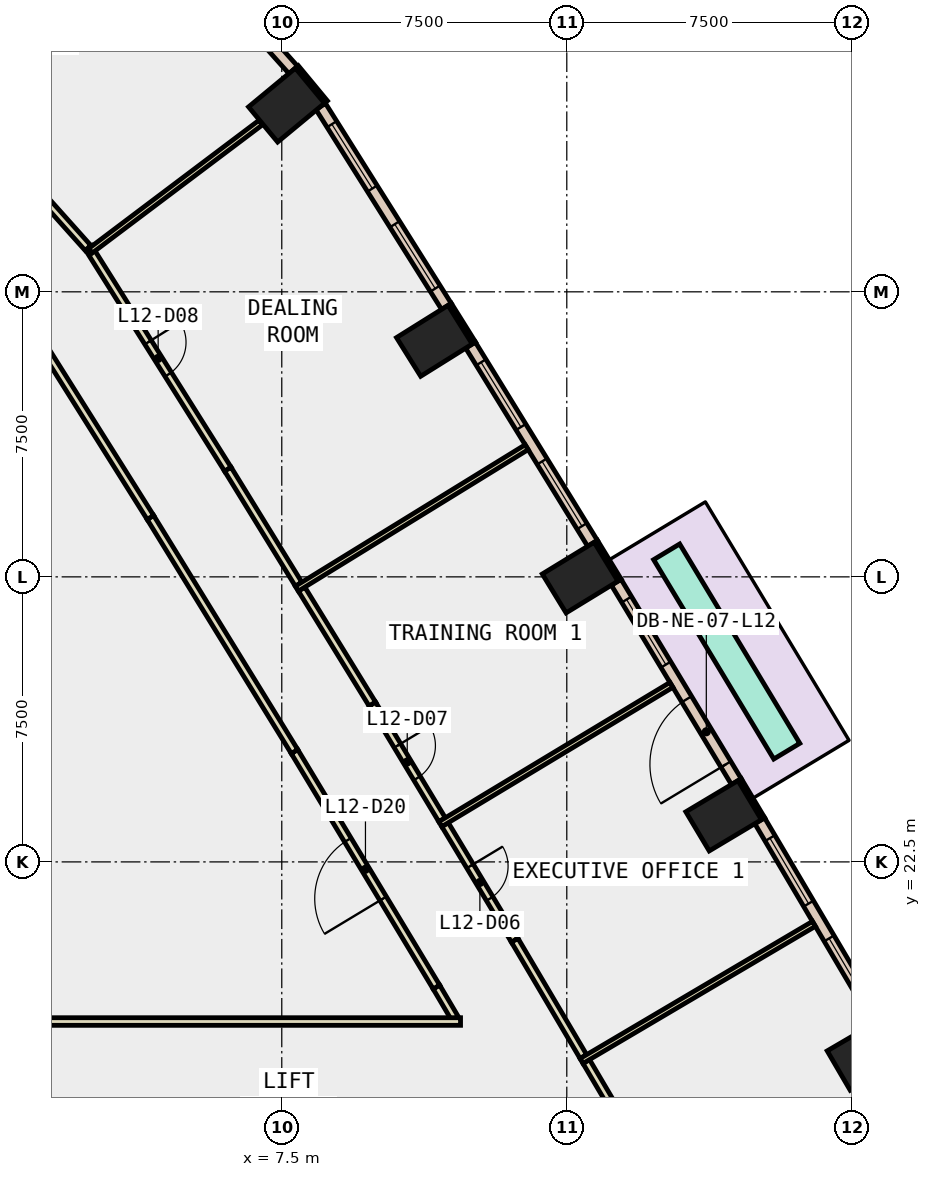
"""IFC4 building model, lengths in metres.
Left out: names, types, materials, properties, quantities, classifications, styles, units other than length and angle.
Written with IfcOpenShell. Run it as: python <this file> out.ifc"""

import sys

from ifc_helpers import new_model, si_unit, direction, frame, frame_2d, origin, origin_2d, place, context, subcontext, project, spatial, rectangle, extrude, element, fill, save


model = new_model("IFC4")
c1 = context("Model", 3, precision=1e-05, world=origin(), true_north=direction((0.0, 1.0)))
c2 = subcontext(c1, "Body", "Model", "MODEL_VIEW")
j1 = project(units=[si_unit("LENGTHUNIT", "METRE"), si_unit("PLANEANGLEUNIT", "RADIAN")], contexts=[c1])
p1 = place(None, origin())
s1 = spatial("IfcSite", under=j1, at=p1, CompositionType="ELEMENT")
p2 = place(p1, origin())
s2 = spatial("IfcBuilding", under=s1, at=p2, CompositionType="ELEMENT")
p3 = place(p2, frame((0.0, 0.0, 60.2)))
s3 = spatial("IfcBuildingStorey", under=s2, at=p3, CompositionType="ELEMENT", Elevation=60.2)
for number, where, z_axis, x_axis in (
    (1, (22.846, 17.413, -0.4), (0.0, 0.0, 1.0), (-0.504, 0.864, 0.0)),
    (2, (19.127, 23.714, -0.4), (0.0, 0.0, 1.0), (-0.513, 0.858, 0.0)),
    (3, (15.351, 29.981, -0.4), (0.0, 0.0, 1.0), (-0.522, 0.853, 0.0)),
    (4, (11.516, 36.211, -0.4), (0.0, 0.0, 1.0), (-0.53, 0.848, 0.0)),
    (5, (7.625, 42.414, -0.4), (0.0, 0.0, 1.0), (-0.638, 0.77, 0.0)),
):
    element("IfcColumn", number, at=place(p3, frame(where, z_axis=z_axis, x_axis=x_axis)), inside=s3, PredefinedType="COLUMN", context=c2, shape_type="SweptSolid", body=[
        extrude(rectangle(XDim=1.2, YDim=1.6, at=origin_2d()), origin(), (0.0, 0.0, 1.0), 4.2),
    ])
for number, where, z_axis, x_axis in (
    (6, (20.165, 23.635, 0.0), (0.0, 0.0, 1.0), (-0.513, 0.858, 0.0)),
    (7, (16.389, 29.912, 0.0), (0.0, 0.0, 1.0), (-0.522, 0.853, 0.0)),
):
    element("IfcWall", number, at=place(p3, frame(where, z_axis=z_axis, x_axis=x_axis)), inside=s3, PredefinedType="STANDARD", context=c2, shape_type="SweptSolid", body=[
        extrude(rectangle(XDim=1.2, YDim=0.1, at=frame_2d((0.6, 0.0))), origin(), (0.0, 0.0, 1.0), 3.8),
    ])
p4 = place(p3, frame((12.555, 36.153, 0.0), z_axis=(0.0, 0.0, 1.0), x_axis=(-0.530273374944, 0.847826720401, 0.0)))
e8 = element("IfcWall", 8, at=p4, inside=s3, PredefinedType="STANDARD", context=c2, shape_type="SweptSolid", body=[
    extrude(rectangle(XDim=1.199, YDim=0.1, at=frame_2d((0.6, 0.0))), origin(), (0.0, 0.0, 1.0), 3.8),
])
p5 = place(p3, frame((8.662, 42.494, 0.0), z_axis=(0.0, 0.0, 1.0), x_axis=(-0.637759271497, 0.770235750676, 0.0)))
e9 = element("IfcWall", 9, at=p5, inside=s3, PredefinedType="STANDARD", context=c2, shape_type="SweptSolid", body=[
    extrude(rectangle(XDim=1.2, YDim=0.1, at=frame_2d((0.6, 0.0))), origin(), (0.0, 0.0, 1.0), 3.8),
])
p6 = place(p3, frame((23.189, 18.307, 0.0), z_axis=(0.0, 0.0, 1.0), x_axis=(-0.508163938648, 0.861260362177, 0.0)))
e10 = element("IfcWall", 10, at=p6, inside=s3, PredefinedType="STANDARD", context=c2, shape_type="SweptSolid", body=[
    extrude(rectangle(XDim=6.126, YDim=0.3, at=frame_2d((3.063, 0.0))), origin(), (0.0, 0.0, 1.0), 3.8),
])
p7 = place(p6, frame((0.531, 0.0, 0.9)))
e11 = element("IfcOpeningElement", 11, at=p7, cuts=e10, PredefinedType="OPENING", context=c2, shape_type="SweptSolid", body=[
    extrude(rectangle(XDim=2.0, YDim=2.6, at=frame_2d((1.0, 1.3))), frame((0.0, 0.16, 0.0), z_axis=(0.0, -1.0, 0.0), x_axis=(1.0, 0.0, 0.0)), (0.0, 0.0, 1.0), 0.32),
])
p8 = place(p6, frame((3.594, 0.0, 0.9)))
e12 = element("IfcOpeningElement", 12, at=p8, cuts=e10, PredefinedType="OPENING", context=c2, shape_type="SweptSolid", body=[
    extrude(rectangle(XDim=2.0, YDim=2.6, at=frame_2d((1.0, 1.3))), frame((0.0, 0.16, 0.0), z_axis=(0.0, -1.0, 0.0), x_axis=(1.0, 0.0, 0.0)), (0.0, 0.0, 1.0), 0.32),
])
p9 = place(p3, frame((19.462, 24.612, 0.0), z_axis=(0.0, 0.0, 1.0), x_axis=(-0.516147563478, 0.856499674674, 0.0)))
e13 = element("IfcWall", 13, at=p9, inside=s3, PredefinedType="STANDARD", context=c2, shape_type="SweptSolid", body=[
    extrude(rectangle(XDim=6.126, YDim=0.3, at=frame_2d((3.063, 0.0))), origin(), (0.0, 0.0, 1.0), 3.8),
])
p10 = place(p9, frame((0.532, 0.0, 0.0)))
e14 = element("IfcOpeningElement", 14, at=p10, cuts=e13, PredefinedType="OPENING", context=c2, shape_type="SweptSolid", body=[
    extrude(rectangle(XDim=2.0, YDim=2.4, at=frame_2d((1.0, 1.2))), frame((0.0, 0.16, 0.0), z_axis=(0.0, -1.0, 0.0), x_axis=(1.0, 0.0, 0.0)), (0.0, 0.0, 1.0), 0.32),
])
p11 = place(p9, frame((3.595, 0.0, 0.9)))
e15 = element("IfcOpeningElement", 15, at=p11, cuts=e13, PredefinedType="OPENING", context=c2, shape_type="SweptSolid", body=[
    extrude(rectangle(XDim=2.0, YDim=2.6, at=frame_2d((1.0, 1.3))), frame((0.0, 0.16, 0.0), z_axis=(0.0, -1.0, 0.0), x_axis=(1.0, 0.0, 0.0)), (0.0, 0.0, 1.0), 0.32),
])
p12 = place(p3, frame((15.677, 30.882, 0.0), z_axis=(0.0, 0.0, 1.0), x_axis=(-0.524239751329, 0.851570715282, 0.0)))
e16 = element("IfcWall", 16, at=p12, inside=s3, PredefinedType="STANDARD", context=c2, shape_type="SweptSolid", body=[
    extrude(rectangle(XDim=6.125, YDim=0.3, at=frame_2d((3.062, 0.0))), origin(), (0.0, 0.0, 1.0), 3.8),
])
p13 = place(p12, frame((0.531, 0.0, 0.9)))
e17 = element("IfcOpeningElement", 17, at=p13, cuts=e16, PredefinedType="OPENING", context=c2, shape_type="SweptSolid", body=[
    extrude(rectangle(XDim=2.0, YDim=2.6, at=frame_2d((1.0, 1.3))), frame((0.0, 0.16, 0.0), z_axis=(0.0, -1.0, 0.0), x_axis=(1.0, 0.0, 0.0)), (0.0, 0.0, 1.0), 0.32),
])
p14 = place(p12, frame((3.594, 0.0, 0.9)))
e18 = element("IfcOpeningElement", 18, at=p14, cuts=e16, PredefinedType="OPENING", context=c2, shape_type="SweptSolid", body=[
    extrude(rectangle(XDim=2.0, YDim=2.6, at=frame_2d((1.0, 1.3))), frame((0.0, 0.16, 0.0), z_axis=(0.0, -1.0, 0.0), x_axis=(1.0, 0.0, 0.0)), (0.0, 0.0, 1.0), 0.32),
])
p15 = place(p3, frame((11.833, 37.116, 0.0), z_axis=(0.0, 0.0, 1.0), x_axis=(-0.532322705893, 0.846541515102, 0.0)))
e19 = element("IfcWall", 19, at=p15, inside=s3, PredefinedType="STANDARD", context=c2, shape_type="SweptSolid", body=[
    extrude(rectangle(XDim=6.218, YDim=0.3, at=frame_2d((3.109, 0.0))), origin(), (0.0, 0.0, 1.0), 3.8),
])
p16 = place(p15, frame((0.555, 0.0, 0.9)))
e20 = element("IfcOpeningElement", 20, at=p16, cuts=e19, PredefinedType="OPENING", context=c2, shape_type="SweptSolid", body=[
    extrude(rectangle(XDim=2.0, YDim=2.6, at=frame_2d((1.0, 1.3))), frame((0.0, 0.16, 0.0), z_axis=(0.0, -1.0, 0.0), x_axis=(1.0, 0.0, 0.0)), (0.0, 0.0, 1.0), 0.32),
])
p17 = place(p15, frame((3.664, 0.0, 0.9)))
e21 = element("IfcOpeningElement", 21, at=p17, cuts=e19, PredefinedType="OPENING", context=c2, shape_type="SweptSolid", body=[
    extrude(rectangle(XDim=2.0, YDim=2.6, at=frame_2d((1.0, 1.3))), frame((0.0, 0.16, 0.0), z_axis=(0.0, -1.0, 0.0), x_axis=(1.0, 0.0, 0.0)), (0.0, 0.0, 1.0), 0.32),
])
p18 = place(p3, frame((7.803, 43.339, 0.0), z_axis=(0.0, 0.0, 1.0), x_axis=(-0.666901909312, 0.745145518242, 0.0)))
e22 = element("IfcWall", 22, at=p18, inside=s3, PredefinedType="STANDARD", context=c2, shape_type="SweptSolid", body=[
    extrude(rectangle(XDim=3.666, YDim=0.3, at=frame_2d((1.833, 0.0))), origin(), (0.0, 0.0, 1.0), 3.8),
])
p19 = place(p18, frame((1.133, 0.0, 0.9)))
e23 = element("IfcOpeningElement", 23, at=p19, cuts=e22, PredefinedType="OPENING", context=c2, shape_type="SweptSolid", body=[
    extrude(rectangle(XDim=1.4, YDim=2.6, at=frame_2d((0.7, 1.3))), frame((0.0, 0.16, 0.0), z_axis=(0.0, -1.0, 0.0), x_axis=(1.0, 0.0, 0.0)), (0.0, 0.0, 1.0), 0.32),
])
p20 = place(p3, frame((20.789, 25.413, 0.0), z_axis=(0.0, 0.0, 1.0), x_axis=(-0.516130324979, 0.856510062776, 0.0)))
e24 = element("IfcWall", 24, at=p20, inside=s3, PredefinedType="STANDARD", context=c2, shape_type="SweptSolid", body=[
    extrude(rectangle(XDim=6.125, YDim=0.8, at=frame_2d((3.062, 0.0))), origin(), (0.0, 0.0, 1.0), 0.8),
])
p21 = place(p3, frame((12.054, 18.386, 0.0), z_axis=(0.0, 0.0, 1.0), x_axis=(-0.508048285953, 0.861328589529, 0.0)))
e25 = element("IfcWall", 25, at=p21, inside=s3, PredefinedType="PARTITIONING", context=c2, shape_type="SweptSolid", body=[
    extrude(rectangle(XDim=0.954, YDim=0.2, at=frame_2d((0.477, 0.0))), origin(), (0.0, 0.0, 1.0), 3.8),
])
p22 = place(p3, frame((11.569, 19.208, 0.0), z_axis=(0.0, 0.0, 1.0), x_axis=(-0.516172233954, 0.85648480716, 0.0)))
e26 = element("IfcWall", 26, at=p22, inside=s3, PredefinedType="PARTITIONING", context=c2, shape_type="SweptSolid", body=[
    extrude(rectangle(XDim=7.234, YDim=0.2, at=frame_2d((3.617, 0.0))), origin(), (0.0, 0.0, 1.0), 3.8),
])
p23 = place(p22, frame((2.717, 0.0, 0.0)))
e27 = element("IfcOpeningElement", 27, at=p23, cuts=e26, PredefinedType="OPENING", context=c2, shape_type="SweptSolid", body=[
    extrude(rectangle(XDim=1.8, YDim=2.1, at=frame_2d((0.9, 1.05))), frame((0.0, 0.11, 0.0), z_axis=(0.0, -1.0, 0.0), x_axis=(1.0, 0.0, 0.0)), (0.0, 0.0, 1.0), 0.22),
])
p24 = place(p3, frame((7.835, 25.404, 0.0), z_axis=(0.0, 0.0, 1.0), x_axis=(-0.524225471951, 0.851579505717, 0.0)))
e28 = element("IfcWall", 28, at=p24, inside=s3, PredefinedType="PARTITIONING", context=c2, shape_type="SweptSolid", body=[
    extrude(rectangle(XDim=7.233, YDim=0.2, at=frame_2d((3.617, 0.0))), origin(), (0.0, 0.0, 1.0), 3.8),
])
p25 = place(p3, frame((4.043, 31.564, 0.0), z_axis=(0.0, 0.0, 1.0), x_axis=(-0.532301094997, 0.846555104092, 0.0)))
e29 = element("IfcWall", 29, at=p25, inside=s3, PredefinedType="PARTITIONING", context=c2, shape_type="SweptSolid", body=[
    extrude(rectangle(XDim=6.677, YDim=0.2, at=frame_2d((3.338, 0.0))), origin(), (0.0, 0.0, 1.0), 3.8),
])
p26 = place(p3, frame((15.512, 17.248, 0.0), z_axis=(0.0, 0.0, 1.0), x_axis=(0.508178415101, -0.861251820564, 0.0)))
e30 = element("IfcWall", 30, at=p26, inside=s3, PredefinedType="PARTITIONING", context=c2, shape_type="SweptSolid", body=[
    extrude(rectangle(XDim=3.554, YDim=0.2, at=frame_2d((1.777, 0.0))), origin(), (0.0, 0.0, 1.0), 3.8),
])
p27 = place(p3, frame((11.796, 23.481, 0.0), z_axis=(0.0, 0.0, 1.0), x_axis=(0.516070934647, -0.8565458484, 0.0)))
e31 = element("IfcWall", 31, at=p27, inside=s3, PredefinedType="PARTITIONING", context=c2, shape_type="SweptSolid", body=[
    extrude(rectangle(XDim=3.554, YDim=0.2, at=frame_2d((1.777, 0.0))), origin(), (0.0, 0.0, 1.0), 3.8),
])
p28 = place(p27, frame((1.277, 0.0, 0.0)))
e32 = element("IfcOpeningElement", 32, at=p28, cuts=e31, PredefinedType="OPENING", context=c2, shape_type="SweptSolid", body=[
    extrude(rectangle(XDim=1.0, YDim=2.1, at=frame_2d((0.5, 1.05))), frame((0.0, 0.11, 0.0), z_axis=(0.0, -1.0, 0.0), x_axis=(1.0, 0.0, 0.0)), (0.0, 0.0, 1.0), 0.22),
])
p29 = place(p3, frame((13.63, 20.437, 0.0), z_axis=(0.0, 0.0, 1.0), x_axis=(0.508298695021, -0.861180838523, 0.0)))
e33 = element("IfcWall", 33, at=p29, inside=s3, PredefinedType="PARTITIONING", context=c2, shape_type="SweptSolid", body=[
    extrude(rectangle(XDim=3.553, YDim=0.2, at=frame_2d((1.777, 0.0))), origin(), (0.0, 0.0, 1.0), 3.8),
])
p30 = place(p3, frame((8.022, 29.678, 0.0), z_axis=(0.0, 0.0, 1.0), x_axis=(0.524093591744, -0.851660676029, 0.0)))
e34 = element("IfcWall", 34, at=p30, inside=s3, PredefinedType="PARTITIONING", context=c2, shape_type="SweptSolid", body=[
    extrude(rectangle(XDim=3.553, YDim=0.2, at=frame_2d((1.776, 0.0))), origin(), (0.0, 0.0, 1.0), 3.8),
])
p31 = place(p3, frame((9.884, 26.652, 0.0), z_axis=(0.0, 0.0, 1.0), x_axis=(0.516162051318, -0.856490943781, 0.0)))
e35 = element("IfcWall", 35, at=p31, inside=s3, PredefinedType="PARTITIONING", context=c2, shape_type="SweptSolid", body=[
    extrude(rectangle(XDim=3.553, YDim=0.2, at=frame_2d((1.777, 0.0))), origin(), (0.0, 0.0, 1.0), 3.8),
])
p32 = place(p31, frame((1.277, 0.0, 0.0)))
e36 = element("IfcOpeningElement", 36, at=p32, cuts=e35, PredefinedType="OPENING", context=c2, shape_type="SweptSolid", body=[
    extrude(rectangle(XDim=1.0, YDim=2.1, at=frame_2d((0.5, 1.05))), frame((0.0, 0.11, 0.0), z_axis=(0.0, -1.0, 0.0), x_axis=(1.0, 0.0, 0.0)), (0.0, 0.0, 1.0), 0.22),
])
p33 = place(p3, frame((2.413, 38.665, 0.0), z_axis=(0.0, 0.0, 1.0), x_axis=(0.532328273879, -0.846538013812, 0.0)))
e37 = element("IfcWall", 37, at=p33, inside=s3, PredefinedType="PARTITIONING", context=c2, shape_type="SweptSolid", body=[
    extrude(rectangle(XDim=6.89, YDim=0.2, at=frame_2d((3.445, 0.0))), origin(), (0.0, 0.0, 1.0), 3.8),
])
p34 = place(p33, frame((2.945, 0.0, 0.0)))
e38 = element("IfcOpeningElement", 38, at=p34, cuts=e37, PredefinedType="OPENING", context=c2, shape_type="SweptSolid", body=[
    extrude(rectangle(XDim=1.0, YDim=2.1, at=frame_2d((0.5, 1.05))), frame((0.0, 0.11, 0.0), z_axis=(0.0, -1.0, 0.0), x_axis=(1.0, 0.0, 0.0)), (0.0, 0.0, 1.0), 0.22),
])
p35 = place(p3, frame((6.081, 32.832, 0.0), z_axis=(0.0, 0.0, 1.0), x_axis=(0.524062922014, -0.851679548756, 0.0)))
e39 = element("IfcWall", 39, at=p35, inside=s3, PredefinedType="PARTITIONING", context=c2, shape_type="SweptSolid", body=[
    extrude(rectangle(XDim=3.553, YDim=0.2, at=frame_2d((1.777, 0.0))), origin(), (0.0, 0.0, 1.0), 3.8),
])
p36 = place(p3, frame((0.879, 40.355, 0.0), z_axis=(0.0, 0.0, 1.0), x_axis=(0.666791730919, -0.745244112743, 0.0)))
e40 = element("IfcWall", 40, at=p36, inside=s3, PredefinedType="PARTITIONING", context=c2, shape_type="SweptSolid", body=[
    extrude(rectangle(XDim=2.281, YDim=0.2, at=frame_2d((1.141, 0.0))), origin(), (0.0, 0.0, 1.0), 3.8),
])
p37 = place(p3, frame((15.388, 17.261, 0.0), z_axis=(0.0, 0.0, 1.0), x_axis=(0.861189945173, 0.50828326584, 0.0)))
e41 = element("IfcWall", 41, at=p37, inside=s3, PredefinedType="PARTITIONING", context=c2, shape_type="SweptSolid", body=[
    extrude(rectangle(XDim=7.101, YDim=0.15, at=frame_2d((3.55, 0.0))), origin(), (0.0, 0.0, 1.0), 3.8),
])
p38 = place(p3, frame((11.672, 23.493, 0.0), z_axis=(0.0, 0.0, 1.0), x_axis=(0.856462653555, 0.516208991656, 0.0)))
e42 = element("IfcWall", 42, at=p38, inside=s3, PredefinedType="PARTITIONING", context=c2, shape_type="SweptSolid", body=[
    extrude(rectangle(XDim=7.1, YDim=0.15, at=frame_2d((3.55, 0.0))), origin(), (0.0, 0.0, 1.0), 3.8),
])
p39 = place(p3, frame((7.897, 29.69, 0.0), z_axis=(0.0, 0.0, 1.0), x_axis=(0.851604009471, 0.524185664677, 0.0)))
e43 = element("IfcWall", 43, at=p39, inside=s3, PredefinedType="PARTITIONING", context=c2, shape_type="SweptSolid", body=[
    extrude(rectangle(XDim=7.101, YDim=0.15, at=frame_2d((3.55, 0.0))), origin(), (0.0, 0.0, 1.0), 3.8),
])
p40 = place(p3, frame((2.466, 38.58, 0.0), z_axis=(0.0, 0.0, 1.0), x_axis=(0.798796148738, 0.601601789193, 0.0)))
e44 = element("IfcWall", 44, at=p40, inside=s3, PredefinedType="PARTITIONING", context=c2, shape_type="SweptSolid", body=[
    extrude(rectangle(XDim=5.605, YDim=0.15, at=frame_2d((2.802, 0.0))), origin(), (0.0, 0.0, 1.0), 3.8),
])
p41 = place(p3, frame((0.4, 18.3, 0.0), z_axis=(0.0, 0.0, 1.0), x_axis=(1.0, 0.0, 0.0)))
e45 = element("IfcWall", 45, at=p41, inside=s3, PredefinedType="PARTITIONING", context=c2, shape_type="SweptSolid", body=[
    extrude(rectangle(XDim=11.804, YDim=0.2, at=frame_2d((5.902, 0.0))), origin(), (0.0, 0.0, 1.0), 3.8),
])
p42 = place(p7, origin())
e46 = element("IfcWindow", 46, at=p42, inside=s3, PartitioningType="SINGLE_PANEL", PredefinedType="WINDOW", context=c2, shape_type="SweptSolid", body=[
    extrude(rectangle(XDim=2.0, YDim=2.6, at=frame_2d((1.0, 1.3))), frame((0.0, 0.03, 0.0), z_axis=(0.0, -1.0, 0.0), x_axis=(1.0, 0.0, 0.0)), (0.0, 0.0, 1.0), 0.06),
])
fill(e11, e46)
p43 = place(p8, origin())
e47 = element("IfcWindow", 47, at=p43, inside=s3, PartitioningType="SINGLE_PANEL", PredefinedType="WINDOW", context=c2, shape_type="SweptSolid", body=[
    extrude(rectangle(XDim=2.0, YDim=2.6, at=frame_2d((1.0, 1.3))), frame((0.0, 0.03, 0.0), z_axis=(0.0, -1.0, 0.0), x_axis=(1.0, 0.0, 0.0)), (0.0, 0.0, 1.0), 0.06),
])
fill(e12, e47)
p44 = place(p10, origin())
e48 = element("IfcDoor", 48, at=p44, inside=s3, OperationType="SLIDING_TO_LEFT", PredefinedType="DOOR", context=c2, shape_type="SweptSolid", body=[
    extrude(rectangle(XDim=2.0, YDim=2.4, at=frame_2d((1.0, 1.2))), frame((0.0, 0.025, 0.0), z_axis=(0.0, -1.0, 0.0), x_axis=(1.0, 0.0, 0.0)), (0.0, 0.0, 1.0), 0.05),
])
fill(e14, e48)
p45 = place(p11, origin())
e49 = element("IfcWindow", 49, at=p45, inside=s3, PartitioningType="SINGLE_PANEL", PredefinedType="WINDOW", context=c2, shape_type="SweptSolid", body=[
    extrude(rectangle(XDim=2.0, YDim=2.6, at=frame_2d((1.0, 1.3))), frame((0.0, 0.03, 0.0), z_axis=(0.0, -1.0, 0.0), x_axis=(1.0, 0.0, 0.0)), (0.0, 0.0, 1.0), 0.06),
])
fill(e15, e49)
p46 = place(p13, origin())
e50 = element("IfcWindow", 50, at=p46, inside=s3, PartitioningType="SINGLE_PANEL", PredefinedType="WINDOW", context=c2, shape_type="SweptSolid", body=[
    extrude(rectangle(XDim=2.0, YDim=2.6, at=frame_2d((1.0, 1.3))), frame((0.0, 0.03, 0.0), z_axis=(0.0, -1.0, 0.0), x_axis=(1.0, 0.0, 0.0)), (0.0, 0.0, 1.0), 0.06),
])
fill(e17, e50)
p47 = place(p14, origin())
e51 = element("IfcWindow", 51, at=p47, inside=s3, PartitioningType="SINGLE_PANEL", PredefinedType="WINDOW", context=c2, shape_type="SweptSolid", body=[
    extrude(rectangle(XDim=2.0, YDim=2.6, at=frame_2d((1.0, 1.3))), frame((0.0, 0.03, 0.0), z_axis=(0.0, -1.0, 0.0), x_axis=(1.0, 0.0, 0.0)), (0.0, 0.0, 1.0), 0.06),
])
fill(e18, e51)
p48 = place(p16, origin())
e52 = element("IfcWindow", 52, at=p48, inside=s3, PartitioningType="SINGLE_PANEL", PredefinedType="WINDOW", context=c2, shape_type="SweptSolid", body=[
    extrude(rectangle(XDim=2.0, YDim=2.6, at=frame_2d((1.0, 1.3))), frame((0.0, 0.03, 0.0), z_axis=(0.0, -1.0, 0.0), x_axis=(1.0, 0.0, 0.0)), (0.0, 0.0, 1.0), 0.06),
])
fill(e20, e52)
p49 = place(p17, origin())
e53 = element("IfcWindow", 53, at=p49, inside=s3, PartitioningType="SINGLE_PANEL", PredefinedType="WINDOW", context=c2, shape_type="SweptSolid", body=[
    extrude(rectangle(XDim=2.0, YDim=2.6, at=frame_2d((1.0, 1.3))), frame((0.0, 0.03, 0.0), z_axis=(0.0, -1.0, 0.0), x_axis=(1.0, 0.0, 0.0)), (0.0, 0.0, 1.0), 0.06),
])
fill(e21, e53)
p50 = place(p28, origin())
e54 = element("IfcDoor", 54, at=p50, inside=s3, OperationType="SINGLE_SWING_LEFT", PredefinedType="DOOR", context=c2, shape_type="SweptSolid", body=[
    extrude(rectangle(XDim=1.0, YDim=2.1, at=frame_2d((0.5, 1.05))), frame((0.0, 0.025, 0.0), z_axis=(0.0, -1.0, 0.0), x_axis=(1.0, 0.0, 0.0)), (0.0, 0.0, 1.0), 0.05),
])
fill(e32, e54)
p51 = place(p32, origin())
e55 = element("IfcDoor", 55, at=p51, inside=s3, OperationType="SINGLE_SWING_LEFT", PredefinedType="DOOR", context=c2, shape_type="SweptSolid", body=[
    extrude(rectangle(XDim=1.0, YDim=2.1, at=frame_2d((0.5, 1.05))), frame((0.0, 0.025, 0.0), z_axis=(0.0, -1.0, 0.0), x_axis=(1.0, 0.0, 0.0)), (0.0, 0.0, 1.0), 0.05),
])
fill(e36, e55)
p52 = place(p34, origin())
e56 = element("IfcDoor", 56, at=p52, inside=s3, OperationType="SINGLE_SWING_LEFT", PredefinedType="DOOR", context=c2, shape_type="SweptSolid", body=[
    extrude(rectangle(XDim=1.0, YDim=2.1, at=frame_2d((0.5, 1.05))), frame((0.0, 0.025, 0.0), z_axis=(0.0, -1.0, 0.0), x_axis=(1.0, 0.0, 0.0)), (0.0, 0.0, 1.0), 0.05),
])
fill(e38, e56)
p53 = place(p23, origin())
e57 = element("IfcDoor", 57, at=p53, inside=s3, OperationType="DOUBLE_DOOR_SINGLE_SWING", PredefinedType="DOOR", context=c2, shape_type="SweptSolid", body=[
    extrude(rectangle(XDim=1.8, YDim=2.1, at=frame_2d((0.9, 1.05))), frame((0.0, 0.025, 0.0), z_axis=(0.0, -1.0, 0.0), x_axis=(1.0, 0.0, 0.0)), (0.0, 0.0, 1.0), 0.05),
])
fill(e27, e57)
save(model, sys.argv[1])
